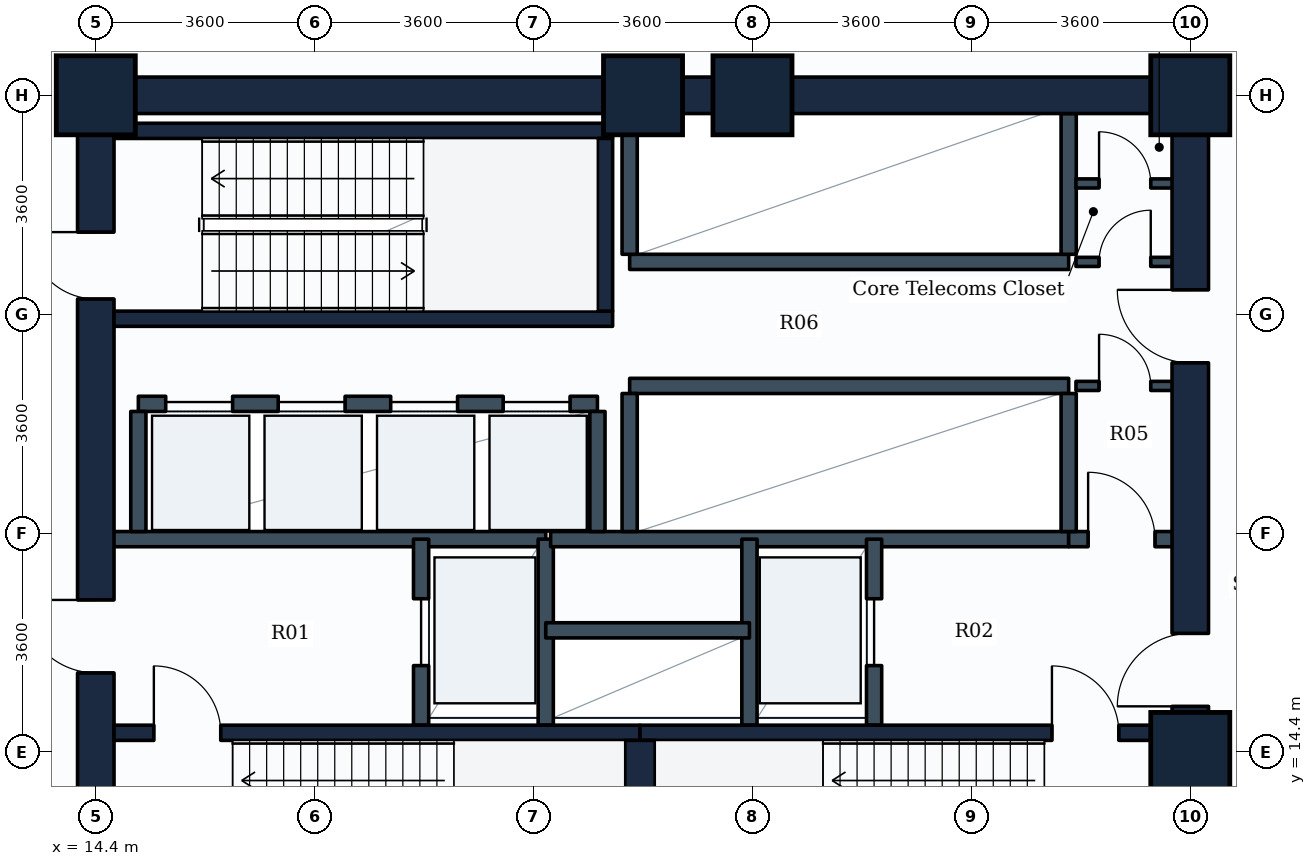
"""IFC4 building model, lengths in metres.
Left out: names, types, materials, properties, quantities, classifications, styles, units other than length and angle.
Written with IfcOpenShell. Run it as: python <this file> out.ifc"""

import sys

from ifc_helpers import new_model, si_unit, direction, frame, frame_2d, origin, origin_2d, place, context, subcontext, project, spatial, rectangle, extrude, element, fill, save


model = new_model("IFC4")
c1 = context("Model", 3, precision=1e-05, world=origin(), true_north=direction((0.0, 1.0)))
c2 = subcontext(c1, "Body", "Model", "MODEL_VIEW")
j1 = project(units=[si_unit("LENGTHUNIT", "METRE"), si_unit("PLANEANGLEUNIT", "RADIAN")], contexts=[c1])
p1 = place(None, origin())
s1 = spatial("IfcSite", under=j1, at=p1, CompositionType="ELEMENT")
p2 = place(p1, origin())
s2 = spatial("IfcBuilding", under=s1, at=p2, CompositionType="ELEMENT")
p3 = place(p2, frame((0.0, 0.0, 14.8)))
s3 = spatial("IfcBuildingStorey", under=s2, at=p3, CompositionType="ELEMENT", Elevation=14.8)
for number, where, z_axis, x_axis in (
    (1, (14.4, 25.2, 0.0), (0.0, 0.0, 1.0), (1.0, 0.0, 0.0)),
    (2, (23.4, 25.2, 0.0), (0.0, 0.0, 1.0), (1.0, 0.0, 0.0)),
    (3, (25.2, 25.2, 0.0), (0.0, 0.0, 1.0), (1.0, 0.0, 0.0)),
    (4, (32.4, 14.4, 0.0), (0.0, 0.0, 1.0), (1.0, 0.0, 0.0)),
    (5, (32.4, 25.2, 0.0), (0.0, 0.0, 1.0), (1.0, 0.0, 0.0)),
):
    element("IfcColumn", number, at=place(p3, frame(where, z_axis=z_axis, x_axis=x_axis)), inside=s3, PredefinedType="COLUMN", context=c2, shape_type="SweptSolid", body=[
        extrude(rectangle(XDim=1.3, YDim=1.3, at=origin_2d()), origin(), (0.0, 0.0, 1.0), 4.6),
    ])
p4 = place(p3, frame((14.4, 25.2, 0.0), z_axis=(0.0, 0.0, 1.0), x_axis=(1.0, 0.0, 0.0)))
e6 = element("IfcWall", 6, at=p4, inside=s3, PredefinedType="SHEAR", context=c2, shape_type="SweptSolid", body=[
    extrude(rectangle(XDim=18.0, YDim=0.6, at=frame_2d((9.0, 0.0))), origin(), (0.0, 0.0, 1.0), 4.3),
])
p5 = place(p3, frame((14.4, 10.8, 0.0), z_axis=(0.0, 0.0, 1.0), x_axis=(0.0, 1.0, 0.0)))
e7 = element("IfcWall", 7, at=p5, inside=s3, PredefinedType="SHEAR", context=c2, shape_type="SweptSolid", body=[
    extrude(rectangle(XDim=14.4, YDim=0.6, at=frame_2d((7.2, 0.0))), origin(), (0.0, 0.0, 1.0), 4.3),
])
p6 = place(p5, frame((11.05, 0.0, 0.0)))
e8 = element("IfcOpeningElement", 8, at=p6, cuts=e7, PredefinedType="OPENING", context=c2, shape_type="SweptSolid", body=[
    extrude(rectangle(XDim=1.1, YDim=2.1, at=frame_2d((0.55, 1.05))), frame((0.0, 0.31, 0.0), z_axis=(0.0, -1.0, 0.0), x_axis=(1.0, 0.0, 0.0)), (0.0, 0.0, 1.0), 0.62),
])
p7 = place(p5, frame((4.9, 0.0, 0.0)))
e9 = element("IfcOpeningElement", 9, at=p7, cuts=e7, PredefinedType="OPENING", context=c2, shape_type="SweptSolid", body=[
    extrude(rectangle(XDim=1.2, YDim=2.1, at=frame_2d((0.6, 1.05))), frame((0.0, 0.31, 0.0), z_axis=(0.0, -1.0, 0.0), x_axis=(1.0, 0.0, 0.0)), (0.0, 0.0, 1.0), 0.62),
])
p8 = place(p3, frame((32.4, 10.8, 0.0), z_axis=(0.0, 0.0, 1.0), x_axis=(0.0, 1.0, 0.0)))
e10 = element("IfcWall", 10, at=p8, inside=s3, PredefinedType="SHEAR", context=c2, shape_type="SweptSolid", body=[
    extrude(rectangle(XDim=14.4, YDim=0.6, at=frame_2d((7.2, 0.0))), origin(), (0.0, 0.0, 1.0), 4.3),
])
p9 = place(p8, frame((4.35, 0.0, 0.0)))
e11 = element("IfcOpeningElement", 11, at=p9, cuts=e10, PredefinedType="OPENING", context=c2, shape_type="SweptSolid", body=[
    extrude(rectangle(XDim=1.2, YDim=2.1, at=frame_2d((0.6, 1.05))), frame((0.0, 0.31, 0.0), z_axis=(0.0, -1.0, 0.0), x_axis=(1.0, 0.0, 0.0)), (0.0, 0.0, 1.0), 0.62),
])
p10 = place(p8, frame((10.0, 0.0, 0.0)))
e12 = element("IfcOpeningElement", 12, at=p10, cuts=e10, PredefinedType="OPENING", context=c2, shape_type="SweptSolid", body=[
    extrude(rectangle(XDim=1.2, YDim=2.1, at=frame_2d((0.6, 1.05))), frame((0.0, 0.31, 0.0), z_axis=(0.0, -1.0, 0.0), x_axis=(1.0, 0.0, 0.0)), (0.0, 0.0, 1.0), 0.62),
])
p11 = place(p3, frame((14.7, 14.715, 0.0), z_axis=(0.0, 0.0, 1.0), x_axis=(1.0, 0.0, 0.0)))
e13 = element("IfcWall", 13, at=p11, inside=s3, PredefinedType="SHEAR", context=c2, shape_type="SweptSolid", body=[
    extrude(rectangle(XDim=8.65, YDim=0.25, at=frame_2d((4.325, 0.0))), origin(), (0.0, 0.0, 1.0), 4.3),
])
p12 = place(p11, frame((0.655, 0.0, 0.0)))
e14 = element("IfcOpeningElement", 14, at=p12, cuts=e13, PredefinedType="OPENING", context=c2, shape_type="SweptSolid", body=[
    extrude(rectangle(XDim=1.1, YDim=2.1, at=frame_2d((0.55, 1.05))), frame((0.0, 0.135, 0.0), z_axis=(0.0, -1.0, 0.0), x_axis=(1.0, 0.0, 0.0)), (0.0, 0.0, 1.0), 0.27),
])
p13 = place(p3, frame((23.35, 14.715, 0.0), z_axis=(0.0, 0.0, 1.0), x_axis=(1.0, 0.0, 0.0)))
e15 = element("IfcWall", 15, at=p13, inside=s3, PredefinedType="SHEAR", context=c2, shape_type="SweptSolid", body=[
    extrude(rectangle(XDim=8.75, YDim=0.25, at=frame_2d((4.375, 0.0))), origin(), (0.0, 0.0, 1.0), 4.3),
])
p14 = place(p13, frame((6.775, 0.0, 0.0)))
e16 = element("IfcOpeningElement", 16, at=p14, cuts=e15, PredefinedType="OPENING", context=c2, shape_type="SweptSolid", body=[
    extrude(rectangle(XDim=1.1, YDim=2.1, at=frame_2d((0.55, 1.05))), frame((0.0, 0.135, 0.0), z_axis=(0.0, -1.0, 0.0), x_axis=(1.0, 0.0, 0.0)), (0.0, 0.0, 1.0), 0.27),
])
p15 = place(p3, frame((23.35, 11.75, 0.0), z_axis=(0.0, 0.0, 1.0), x_axis=(0.0, 1.0, 0.0)))
e17 = element("IfcWall", 17, at=p15, inside=s3, PredefinedType="SHEAR", context=c2, shape_type="SweptSolid", body=[
    extrude(rectangle(XDim=2.84, YDim=0.5, at=frame_2d((1.42, 0.0))), origin(), (0.0, 0.0, 1.0), 4.3),
])
for number, where, z_axis, x_axis in (
    (18, (14.7, 21.525, 0.0), (0.0, 0.0, 1.0), (1.0, 0.0, 0.0)),
    (19, (14.7, 24.615, 0.0), (0.0, 0.0, 1.0), (1.0, 0.0, 0.0)),
):
    element("IfcWall", number, at=place(p3, frame(where, z_axis=z_axis, x_axis=x_axis)), inside=s3, PredefinedType="SHEAR", context=c2, shape_type="SweptSolid", body=[
        extrude(rectangle(XDim=8.2, YDim=0.25, at=frame_2d((4.1, 0.0))), origin(), (0.0, 0.0, 1.0), 4.3),
    ])
p16 = place(p3, frame((22.775, 21.65, 0.0), z_axis=(0.0, 0.0, 1.0), x_axis=(0.0, 1.0, 0.0)))
e20 = element("IfcWall", 20, at=p16, inside=s3, PredefinedType="SHEAR", context=c2, shape_type="SweptSolid", body=[
    extrude(rectangle(XDim=2.84, YDim=0.25, at=frame_2d((1.42, 0.0))), origin(), (0.0, 0.0, 1.0), 4.3),
])
p17 = place(p3, frame((14.65, 17.9, 0.0), z_axis=(0.0, 0.0, 1.0), x_axis=(1.0, 0.0, 0.0)))
e21 = element("IfcWall", 21, at=p17, inside=s3, PredefinedType="PARTITIONING", context=c2, shape_type="SweptSolid", body=[
    extrude(rectangle(XDim=7.15, YDim=0.25, at=frame_2d((3.575, 0.0))), origin(), (0.0, 0.0, 1.0), 4.285),
])
p18 = place(p3, frame((19.75, 14.84, 0.0), z_axis=(0.0, 0.0, 1.0), x_axis=(0.0, 1.0, 0.0)))
e22 = element("IfcWall", 22, at=p18, inside=s3, PredefinedType="PARTITIONING", context=c2, shape_type="SweptSolid", body=[
    extrude(rectangle(XDim=3.06, YDim=0.25, at=frame_2d((1.53, 0.0))), origin(), (0.0, 0.0, 1.0), 4.285),
])
p19 = place(p18, frame((0.98, 0.0, 0.0)))
e23 = element("IfcOpeningElement", 23, at=p19, cuts=e22, PredefinedType="OPENING", context=c2, shape_type="SweptSolid", body=[
    extrude(rectangle(XDim=1.1, YDim=2.1, at=frame_2d((0.55, 1.05))), frame((0.0, 0.135, 0.0), z_axis=(0.0, -1.0, 0.0), x_axis=(1.0, 0.0, 0.0)), (0.0, 0.0, 1.0), 0.27),
])
p20 = place(p3, frame((21.8, 14.84, 0.0), z_axis=(0.0, 0.0, 1.0), x_axis=(0.0, 1.0, 0.0)))
e24 = element("IfcWall", 24, at=p20, inside=s3, PredefinedType="PARTITIONING", context=c2, shape_type="SweptSolid", body=[
    extrude(rectangle(XDim=3.06, YDim=0.25, at=frame_2d((1.53, 0.0))), origin(), (0.0, 0.0, 1.0), 4.285),
])
p21 = place(p3, frame((21.88, 17.9, 0.0), z_axis=(0.0, 0.0, 1.0), x_axis=(1.0, 0.0, 0.0)))
e25 = element("IfcWall", 25, at=p21, inside=s3, PredefinedType="PARTITIONING", context=c2, shape_type="SweptSolid", body=[
    extrude(rectangle(XDim=8.52, YDim=0.25, at=frame_2d((4.26, 0.0))), origin(), (0.0, 0.0, 1.0), 4.285),
])
p22 = place(p3, frame((30.4, 17.9, 0.0), z_axis=(0.0, 0.0, 1.0), x_axis=(1.0, 0.0, 0.0)))
e26 = element("IfcWall", 26, at=p22, inside=s3, PredefinedType="PARTITIONING", context=c2, shape_type="SweptSolid", body=[
    extrude(rectangle(XDim=1.75, YDim=0.25, at=frame_2d((0.875, 0.0))), origin(), (0.0, 0.0, 1.0), 4.285),
])
p23 = place(p22, frame((0.32, 0.0, 0.0)))
e27 = element("IfcOpeningElement", 27, at=p23, cuts=e26, PredefinedType="OPENING", context=c2, shape_type="SweptSolid", body=[
    extrude(rectangle(XDim=1.1, YDim=2.1, at=frame_2d((0.55, 1.05))), frame((0.0, 0.135, 0.0), z_axis=(0.0, -1.0, 0.0), x_axis=(1.0, 0.0, 0.0)), (0.0, 0.0, 1.0), 0.27),
])
p24 = place(p3, frame((25.15, 14.84, 0.0), z_axis=(0.0, 0.0, 1.0), x_axis=(0.0, 1.0, 0.0)))
e28 = element("IfcWall", 28, at=p24, inside=s3, PredefinedType="PARTITIONING", context=c2, shape_type="SweptSolid", body=[
    extrude(rectangle(XDim=3.06, YDim=0.25, at=frame_2d((1.53, 0.0))), origin(), (0.0, 0.0, 1.0), 4.285),
])
p25 = place(p3, frame((27.2, 14.84, 0.0), z_axis=(0.0, 0.0, 1.0), x_axis=(0.0, 1.0, 0.0)))
e29 = element("IfcWall", 29, at=p25, inside=s3, PredefinedType="PARTITIONING", context=c2, shape_type="SweptSolid", body=[
    extrude(rectangle(XDim=3.06, YDim=0.25, at=frame_2d((1.53, 0.0))), origin(), (0.0, 0.0, 1.0), 4.285),
])
p26 = place(p25, frame((0.98, 0.0, 0.0)))
e30 = element("IfcOpeningElement", 30, at=p26, cuts=e29, PredefinedType="OPENING", context=c2, shape_type="SweptSolid", body=[
    extrude(rectangle(XDim=1.1, YDim=2.1, at=frame_2d((0.55, 1.05))), frame((0.0, 0.135, 0.0), z_axis=(0.0, -1.0, 0.0), x_axis=(1.0, 0.0, 0.0)), (0.0, 0.0, 1.0), 0.27),
])
p27 = place(p3, frame((21.8, 16.4, 0.0), z_axis=(0.0, 0.0, 1.0), x_axis=(1.0, 0.0, 0.0)))
e31 = element("IfcWall", 31, at=p27, inside=s3, PredefinedType="PARTITIONING", context=c2, shape_type="SweptSolid", body=[
    extrude(rectangle(XDim=3.35, YDim=0.25, at=frame_2d((1.675, 0.0))), origin(), (0.0, 0.0, 1.0), 4.285),
])
p28 = place(p3, frame((15.1, 20.125, 0.0), z_axis=(0.0, 0.0, 1.0), x_axis=(1.0, 0.0, 0.0)))
e32 = element("IfcWall", 32, at=p28, inside=s3, PredefinedType="PARTITIONING", context=c2, shape_type="SweptSolid", body=[
    extrude(rectangle(XDim=7.55, YDim=0.25, at=frame_2d((3.775, 0.0))), origin(), (0.0, 0.0, 1.0), 4.285),
])
p29 = place(p28, frame((0.45, 0.0, 0.0)))
e33 = element("IfcOpeningElement", 33, at=p29, cuts=e32, PredefinedType="OPENING", context=c2, shape_type="SweptSolid", body=[
    extrude(rectangle(XDim=1.1, YDim=2.1, at=frame_2d((0.55, 1.05))), frame((0.0, 0.135, 0.0), z_axis=(0.0, -1.0, 0.0), x_axis=(1.0, 0.0, 0.0)), (0.0, 0.0, 1.0), 0.27),
])
p30 = place(p28, frame((2.3, 0.0, 0.0)))
e34 = element("IfcOpeningElement", 34, at=p30, cuts=e32, PredefinedType="OPENING", context=c2, shape_type="SweptSolid", body=[
    extrude(rectangle(XDim=1.1, YDim=2.1, at=frame_2d((0.55, 1.05))), frame((0.0, 0.135, 0.0), z_axis=(0.0, -1.0, 0.0), x_axis=(1.0, 0.0, 0.0)), (0.0, 0.0, 1.0), 0.27),
])
p31 = place(p28, frame((4.15, 0.0, 0.0)))
e35 = element("IfcOpeningElement", 35, at=p31, cuts=e32, PredefinedType="OPENING", context=c2, shape_type="SweptSolid", body=[
    extrude(rectangle(XDim=1.1, YDim=2.1, at=frame_2d((0.55, 1.05))), frame((0.0, 0.135, 0.0), z_axis=(0.0, -1.0, 0.0), x_axis=(1.0, 0.0, 0.0)), (0.0, 0.0, 1.0), 0.27),
])
p32 = place(p28, frame((6.0, 0.0, 0.0)))
e36 = element("IfcOpeningElement", 36, at=p32, cuts=e32, PredefinedType="OPENING", context=c2, shape_type="SweptSolid", body=[
    extrude(rectangle(XDim=1.1, YDim=2.1, at=frame_2d((0.55, 1.05))), frame((0.0, 0.135, 0.0), z_axis=(0.0, -1.0, 0.0), x_axis=(1.0, 0.0, 0.0)), (0.0, 0.0, 1.0), 0.27),
])
for number, where, z_axis, x_axis in (
    (37, (15.1, 18.025, 0.0), (0.0, 0.0, 1.0), (0.0, 1.0, 0.0)),
    (38, (22.65, 18.025, 0.0), (0.0, 0.0, 1.0), (0.0, 1.0, 0.0)),
):
    element("IfcWall", number, at=place(p3, frame(where, z_axis=z_axis, x_axis=x_axis)), inside=s3, PredefinedType="PARTITIONING", context=c2, shape_type="SweptSolid", body=[
        extrude(rectangle(XDim=1.975, YDim=0.25, at=frame_2d((0.988, 0.0))), origin(), (0.0, 0.0, 1.0), 4.285),
    ])
p33 = place(p3, frame((23.18, 20.42, 0.0), z_axis=(0.0, 0.0, 1.0), x_axis=(1.0, 0.0, 0.0)))
e39 = element("IfcWall", 39, at=p33, inside=s3, PredefinedType="PARTITIONING", context=c2, shape_type="SweptSolid", body=[
    extrude(rectangle(XDim=7.22, YDim=0.25, at=frame_2d((3.61, 0.0))), origin(), (0.0, 0.0, 1.0), 4.285),
])
for number, where, z_axis, x_axis in (
    (40, (23.18, 18.025, 0.0), (0.0, 0.0, 1.0), (0.0, 1.0, 0.0)),
    (41, (30.4, 18.025, 0.0), (0.0, 0.0, 1.0), (0.0, 1.0, 0.0)),
):
    element("IfcWall", number, at=place(p3, frame(where, z_axis=z_axis, x_axis=x_axis)), inside=s3, PredefinedType="PARTITIONING", context=c2, shape_type="SweptSolid", body=[
        extrude(rectangle(XDim=2.27, YDim=0.25, at=frame_2d((1.135, 0.0))), origin(), (0.0, 0.0, 1.0), 4.285),
    ])
p34 = place(p3, frame((23.18, 22.46, 0.0), z_axis=(0.0, 0.0, 1.0), x_axis=(1.0, 0.0, 0.0)))
e42 = element("IfcWall", 42, at=p34, inside=s3, PredefinedType="PARTITIONING", context=c2, shape_type="SweptSolid", body=[
    extrude(rectangle(XDim=7.22, YDim=0.25, at=frame_2d((3.61, 0.0))), origin(), (0.0, 0.0, 1.0), 4.285),
])
for number, where, z_axis, x_axis in (
    (43, (23.18, 22.585, 0.0), (0.0, 0.0, 1.0), (0.0, 1.0, 0.0)),
    (44, (30.4, 22.585, 0.0), (0.0, 0.0, 1.0), (0.0, 1.0, 0.0)),
):
    element("IfcWall", number, at=place(p3, frame(where, z_axis=z_axis, x_axis=x_axis)), inside=s3, PredefinedType="PARTITIONING", context=c2, shape_type="SweptSolid", body=[
        extrude(rectangle(XDim=2.315, YDim=0.25, at=frame_2d((1.157, 0.0))), origin(), (0.0, 0.0, 1.0), 4.285),
    ])
p35 = place(p3, frame((30.52, 22.46, 0.0), z_axis=(0.0, 0.0, 1.0), x_axis=(1.0, 0.0, 0.0)))
e45 = element("IfcWall", 45, at=p35, inside=s3, PredefinedType="PARTITIONING", context=c2, shape_type="SweptSolid", body=[
    extrude(rectangle(XDim=1.63, YDim=0.15, at=frame_2d((0.815, 0.0))), origin(), (0.0, 0.0, 1.0), 4.285),
])
p36 = place(p35, frame((0.38, 0.0, 0.0)))
e46 = element("IfcOpeningElement", 46, at=p36, cuts=e45, PredefinedType="OPENING", context=c2, shape_type="SweptSolid", body=[
    extrude(rectangle(XDim=0.85, YDim=2.1, at=frame_2d((0.425, 1.05))), frame((0.0, 0.085, 0.0), z_axis=(0.0, -1.0, 0.0), x_axis=(1.0, 0.0, 0.0)), (0.0, 0.0, 1.0), 0.17),
])
p37 = place(p3, frame((30.52, 23.75, 0.0), z_axis=(0.0, 0.0, 1.0), x_axis=(1.0, 0.0, 0.0)))
e47 = element("IfcWall", 47, at=p37, inside=s3, PredefinedType="PARTITIONING", context=c2, shape_type="SweptSolid", body=[
    extrude(rectangle(XDim=1.63, YDim=0.15, at=frame_2d((0.815, 0.0))), origin(), (0.0, 0.0, 1.0), 4.285),
])
p38 = place(p37, frame((0.38, 0.0, 0.0)))
e48 = element("IfcOpeningElement", 48, at=p38, cuts=e47, PredefinedType="OPENING", context=c2, shape_type="SweptSolid", body=[
    extrude(rectangle(XDim=0.85, YDim=2.1, at=frame_2d((0.425, 1.05))), frame((0.0, 0.085, 0.0), z_axis=(0.0, -1.0, 0.0), x_axis=(1.0, 0.0, 0.0)), (0.0, 0.0, 1.0), 0.17),
])
p39 = place(p3, frame((30.52, 20.42, 0.0), z_axis=(0.0, 0.0, 1.0), x_axis=(1.0, 0.0, 0.0)))
e49 = element("IfcWall", 49, at=p39, inside=s3, PredefinedType="PARTITIONING", context=c2, shape_type="SweptSolid", body=[
    extrude(rectangle(XDim=1.63, YDim=0.15, at=frame_2d((0.815, 0.0))), origin(), (0.0, 0.0, 1.0), 4.285),
])
p40 = place(p39, frame((0.38, 0.0, 0.0)))
e50 = element("IfcOpeningElement", 50, at=p40, cuts=e49, PredefinedType="OPENING", context=c2, shape_type="SweptSolid", body=[
    extrude(rectangle(XDim=0.85, YDim=2.1, at=frame_2d((0.425, 1.05))), frame((0.0, 0.085, 0.0), z_axis=(0.0, -1.0, 0.0), x_axis=(1.0, 0.0, 0.0)), (0.0, 0.0, 1.0), 0.17),
])
p41 = place(p12, origin())
e51 = element("IfcDoor", 51, at=p41, inside=s3, OperationType="SINGLE_SWING_LEFT", PredefinedType="DOOR", context=c2, shape_type="SweptSolid", body=[
    extrude(rectangle(XDim=1.1, YDim=2.1, at=frame_2d((0.55, 1.05))), frame((0.0, 0.025, 0.0), z_axis=(0.0, -1.0, 0.0), x_axis=(1.0, 0.0, 0.0)), (0.0, 0.0, 1.0), 0.05),
])
fill(e14, e51)
p42 = place(p14, origin())
e52 = element("IfcDoor", 52, at=p42, inside=s3, OperationType="SINGLE_SWING_LEFT", PredefinedType="DOOR", context=c2, shape_type="SweptSolid", body=[
    extrude(rectangle(XDim=1.1, YDim=2.1, at=frame_2d((0.55, 1.05))), frame((0.0, 0.025, 0.0), z_axis=(0.0, -1.0, 0.0), x_axis=(1.0, 0.0, 0.0)), (0.0, 0.0, 1.0), 0.05),
])
fill(e16, e52)
p43 = place(p6, origin())
e53 = element("IfcDoor", 53, at=p43, inside=s3, OperationType="SINGLE_SWING_RIGHT", PredefinedType="DOOR", context=c2, shape_type="SweptSolid", body=[
    extrude(rectangle(XDim=1.1, YDim=2.1, at=frame_2d((0.55, 1.05))), frame((0.0, 0.025, 0.0), z_axis=(0.0, -1.0, 0.0), x_axis=(1.0, 0.0, 0.0)), (0.0, 0.0, 1.0), 0.05),
])
fill(e8, e53)
p44 = place(p19, origin())
e54 = element("IfcDoor", 54, at=p44, inside=s3, OperationType="SLIDING_TO_LEFT", PredefinedType="DOOR", context=c2, shape_type="SweptSolid", body=[
    extrude(rectangle(XDim=1.1, YDim=2.1, at=frame_2d((0.55, 1.05))), frame((0.0, 0.025, 0.0), z_axis=(0.0, -1.0, 0.0), x_axis=(1.0, 0.0, 0.0)), (0.0, 0.0, 1.0), 0.05),
])
fill(e23, e54)
p45 = place(p26, origin())
e55 = element("IfcDoor", 55, at=p45, inside=s3, OperationType="SLIDING_TO_LEFT", PredefinedType="DOOR", context=c2, shape_type="SweptSolid", body=[
    extrude(rectangle(XDim=1.1, YDim=2.1, at=frame_2d((0.55, 1.05))), frame((0.0, 0.025, 0.0), z_axis=(0.0, -1.0, 0.0), x_axis=(1.0, 0.0, 0.0)), (0.0, 0.0, 1.0), 0.05),
])
fill(e30, e55)
p46 = place(p7, origin())
e56 = element("IfcDoor", 56, at=p46, inside=s3, OperationType="SINGLE_SWING_RIGHT", PredefinedType="DOOR", context=c2, shape_type="SweptSolid", body=[
    extrude(rectangle(XDim=1.2, YDim=2.1, at=frame_2d((0.6, 1.05))), frame((0.0, 0.025, 0.0), z_axis=(0.0, -1.0, 0.0), x_axis=(1.0, 0.0, 0.0)), (0.0, 0.0, 1.0), 0.05),
])
fill(e9, e56)
p47 = place(p9, origin())
e57 = element("IfcDoor", 57, at=p47, inside=s3, OperationType="SINGLE_SWING_LEFT", PredefinedType="DOOR", context=c2, shape_type="SweptSolid", body=[
    extrude(rectangle(XDim=1.2, YDim=2.1, at=frame_2d((0.6, 1.05))), frame((0.0, 0.025, 0.0), z_axis=(0.0, -1.0, 0.0), x_axis=(1.0, 0.0, 0.0)), (0.0, 0.0, 1.0), 0.05),
])
fill(e11, e57)
p48 = place(p23, origin())
e58 = element("IfcDoor", 58, at=p48, inside=s3, OperationType="SINGLE_SWING_LEFT", PredefinedType="DOOR", context=c2, shape_type="SweptSolid", body=[
    extrude(rectangle(XDim=1.1, YDim=2.1, at=frame_2d((0.55, 1.05))), frame((0.0, 0.025, 0.0), z_axis=(0.0, -1.0, 0.0), x_axis=(1.0, 0.0, 0.0)), (0.0, 0.0, 1.0), 0.05),
])
fill(e27, e58)
p49 = place(p29, origin())
e59 = element("IfcDoor", 59, at=p49, inside=s3, OperationType="SLIDING_TO_LEFT", PredefinedType="DOOR", context=c2, shape_type="SweptSolid", body=[
    extrude(rectangle(XDim=1.1, YDim=2.1, at=frame_2d((0.55, 1.05))), frame((0.0, 0.025, 0.0), z_axis=(0.0, -1.0, 0.0), x_axis=(1.0, 0.0, 0.0)), (0.0, 0.0, 1.0), 0.05),
])
fill(e33, e59)
p50 = place(p30, origin())
e60 = element("IfcDoor", 60, at=p50, inside=s3, OperationType="SLIDING_TO_LEFT", PredefinedType="DOOR", context=c2, shape_type="SweptSolid", body=[
    extrude(rectangle(XDim=1.1, YDim=2.1, at=frame_2d((0.55, 1.05))), frame((0.0, 0.025, 0.0), z_axis=(0.0, -1.0, 0.0), x_axis=(1.0, 0.0, 0.0)), (0.0, 0.0, 1.0), 0.05),
])
fill(e34, e60)
p51 = place(p31, origin())
e61 = element("IfcDoor", 61, at=p51, inside=s3, OperationType="SLIDING_TO_LEFT", PredefinedType="DOOR", context=c2, shape_type="SweptSolid", body=[
    extrude(rectangle(XDim=1.1, YDim=2.1, at=frame_2d((0.55, 1.05))), frame((0.0, 0.025, 0.0), z_axis=(0.0, -1.0, 0.0), x_axis=(1.0, 0.0, 0.0)), (0.0, 0.0, 1.0), 0.05),
])
fill(e35, e61)
p52 = place(p32, origin())
e62 = element("IfcDoor", 62, at=p52, inside=s3, OperationType="SLIDING_TO_LEFT", PredefinedType="DOOR", context=c2, shape_type="SweptSolid", body=[
    extrude(rectangle(XDim=1.1, YDim=2.1, at=frame_2d((0.55, 1.05))), frame((0.0, 0.025, 0.0), z_axis=(0.0, -1.0, 0.0), x_axis=(1.0, 0.0, 0.0)), (0.0, 0.0, 1.0), 0.05),
])
fill(e36, e62)
p53 = place(p10, origin())
e63 = element("IfcDoor", 63, at=p53, inside=s3, OperationType="SINGLE_SWING_RIGHT", PredefinedType="DOOR", context=c2, shape_type="SweptSolid", body=[
    extrude(rectangle(XDim=1.2, YDim=2.1, at=frame_2d((0.6, 1.05))), frame((0.0, 0.025, 0.0), z_axis=(0.0, -1.0, 0.0), x_axis=(1.0, 0.0, 0.0)), (0.0, 0.0, 1.0), 0.05),
])
fill(e12, e63)
p54 = place(p36, origin())
e64 = element("IfcDoor", 64, at=p54, inside=s3, OperationType="SINGLE_SWING_RIGHT", PredefinedType="DOOR", context=c2, shape_type="SweptSolid", body=[
    extrude(rectangle(XDim=0.85, YDim=2.1, at=frame_2d((0.425, 1.05))), frame((0.0, 0.025, 0.0), z_axis=(0.0, -1.0, 0.0), x_axis=(1.0, 0.0, 0.0)), (0.0, 0.0, 1.0), 0.05),
])
fill(e46, e64)
p55 = place(p38, origin())
e65 = element("IfcDoor", 65, at=p55, inside=s3, OperationType="SINGLE_SWING_LEFT", PredefinedType="DOOR", context=c2, shape_type="SweptSolid", body=[
    extrude(rectangle(XDim=0.85, YDim=2.1, at=frame_2d((0.425, 1.05))), frame((0.0, 0.025, 0.0), z_axis=(0.0, -1.0, 0.0), x_axis=(1.0, 0.0, 0.0)), (0.0, 0.0, 1.0), 0.05),
])
fill(e48, e65)
p56 = place(p40, origin())
e66 = element("IfcDoor", 66, at=p56, inside=s3, OperationType="SINGLE_SWING_LEFT", PredefinedType="DOOR", context=c2, shape_type="SweptSolid", body=[
    extrude(rectangle(XDim=0.85, YDim=2.1, at=frame_2d((0.425, 1.05))), frame((0.0, 0.025, 0.0), z_axis=(0.0, -1.0, 0.0), x_axis=(1.0, 0.0, 0.0)), (0.0, 0.0, 1.0), 0.05),
])
fill(e50, e66)
save(model, sys.argv[1])
